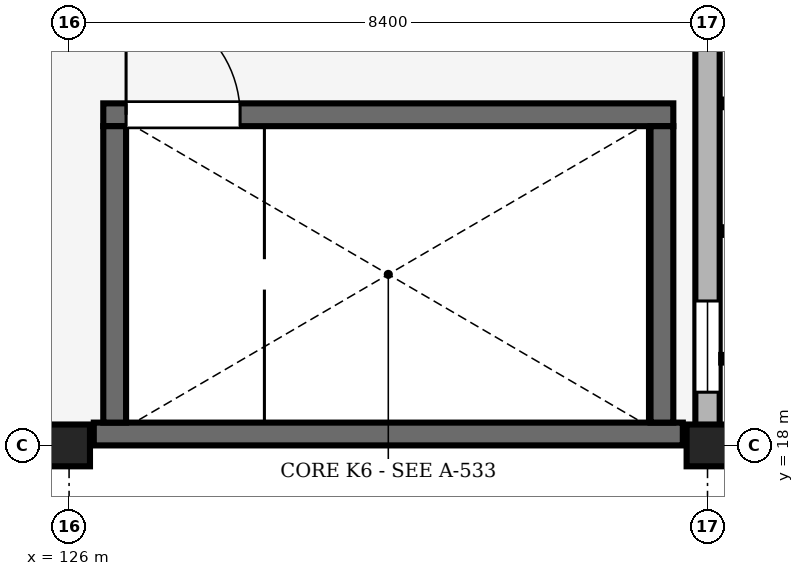
"""IFC4 building model, lengths in metres.
Left out: names, types, materials, properties, quantities, classifications, styles, units other than length and angle.
Written with IfcOpenShell. Run it as: python <this file> out.ifc"""

import sys

from ifc_helpers import new_model, si_unit, direction, frame, frame_2d, origin, origin_2d, place, context, subcontext, project, spatial, rectangle, extrude, element, fill, save


model = new_model("IFC4")
c1 = context("Model", 3, precision=1e-05, world=origin(), true_north=direction((0.0, 1.0)))
c2 = subcontext(c1, "Body", "Model", "MODEL_VIEW")
j1 = project(units=[si_unit("LENGTHUNIT", "METRE"), si_unit("PLANEANGLEUNIT", "RADIAN")], contexts=[c1])
p1 = place(None, origin())
s1 = spatial("IfcSite", under=j1, at=p1, CompositionType="ELEMENT")
p2 = place(p1, origin())
s2 = spatial("IfcBuilding", under=s1, at=p2, CompositionType="ELEMENT")
p3 = place(p2, frame((0.0, 0.0, 9.0)))
s3 = spatial("IfcBuildingStorey", under=s2, at=p3, CompositionType="ELEMENT", Elevation=9.0)
for number, where, z_axis, x_axis in (
    (1, (126.0, 18.0, 0.0), (0.0, 0.0, 1.0), (1.0, 0.0, 0.0)),
    (2, (134.4, 18.0, 0.0), (0.0, 0.0, 1.0), (1.0, 0.0, 0.0)),
):
    element("IfcColumn", number, at=place(p3, frame(where, z_axis=z_axis, x_axis=x_axis)), inside=s3, PredefinedType="COLUMN", context=c2, shape_type="SweptSolid", body=[
        extrude(rectangle(XDim=0.55, YDim=0.55, at=origin_2d()), origin(), (0.0, 0.0, 1.0), 4.2),
    ])
p4 = place(p3, frame((134.4, 18.25, 0.0), z_axis=(0.0, 0.0, 1.0), x_axis=(0.0, 1.0, 0.0)))
e3 = element("IfcWall", 3, at=p4, inside=s3, PredefinedType="SOLIDWALL", context=c2, shape_type="SweptSolid", body=[
    extrude(rectangle(XDim=8.5, YDim=0.32, at=frame_2d((4.25, 0.0))), origin(), (0.0, 0.0, 1.0), 3.43),
])
p5 = place(p4, frame((0.45, 0.0, 0.85)))
e4 = element("IfcOpeningElement", 4, at=p5, cuts=e3, PredefinedType="OPENING", context=c2, shape_type="SweptSolid", body=[
    extrude(rectangle(XDim=1.2, YDim=1.8, at=frame_2d((0.6, 0.9))), frame((0.0, 0.17, 0.0), z_axis=(0.0, -1.0, 0.0), x_axis=(1.0, 0.0, 0.0)), (0.0, 0.0, 1.0), 0.34),
])
p6 = place(p4, frame((5.45, 0.0, 0.85)))
e5 = element("IfcOpeningElement", 5, at=p6, cuts=e3, PredefinedType="OPENING", context=c2, shape_type="SweptSolid", body=[
    extrude(rectangle(XDim=1.2, YDim=1.8, at=frame_2d((0.6, 0.9))), frame((0.0, 0.17, 0.0), z_axis=(0.0, -1.0, 0.0), x_axis=(1.0, 0.0, 0.0)), (0.0, 0.0, 1.0), 0.34),
])
p7 = place(p3, frame((134.53, 18.13, 0.0), z_axis=(0.0, 0.0, 1.0), x_axis=(1.0, 0.0, 0.0)))
e6 = element("IfcWall", 6, at=p7, inside=s3, PredefinedType="PARAPET", context=c2, shape_type="SweptSolid", body=[
    extrude(rectangle(XDim=8.14, YDim=0.26, at=frame_2d((4.07, 0.0))), origin(), (0.0, 0.0, 1.0), 0.85),
])
p8 = place(p3, frame((126.325, 18.15, 0.0), z_axis=(0.0, 0.0, 1.0), x_axis=(1.0, 0.0, 0.0)))
e7 = element("IfcWall", 7, at=p8, inside=s3, PredefinedType="SHEAR", context=c2, shape_type="SweptSolid", body=[
    extrude(rectangle(XDim=7.75, YDim=0.3, at=frame_2d((3.875, 0.0))), origin(), (0.0, 0.0, 1.0), 4.025),
])
p9 = place(p3, frame((126.45, 22.35, 0.0), z_axis=(0.0, 0.0, 1.0), x_axis=(1.0, 0.0, 0.0)))
e8 = element("IfcWall", 8, at=p9, inside=s3, PredefinedType="SHEAR", context=c2, shape_type="SweptSolid", body=[
    extrude(rectangle(XDim=7.5, YDim=0.3, at=frame_2d((3.75, 0.0))), origin(), (0.0, 0.0, 1.0), 4.025),
])
p10 = place(p9, frame((0.3, 0.0, 0.0)))
e9 = element("IfcOpeningElement", 9, at=p10, cuts=e8, PredefinedType="OPENING", context=c2, shape_type="SweptSolid", body=[
    extrude(rectangle(XDim=1.5, YDim=2.2, at=frame_2d((0.75, 1.1))), frame((0.0, 0.16, 0.0), z_axis=(0.0, -1.0, 0.0), x_axis=(1.0, 0.0, 0.0)), (0.0, 0.0, 1.0), 0.32),
])
for number, where, z_axis, x_axis in (
    (10, (126.6, 18.3, 0.0), (0.0, 0.0, 1.0), (0.0, 1.0, 0.0)),
    (11, (133.8, 18.3, 0.0), (0.0, 0.0, 1.0), (0.0, 1.0, 0.0)),
):
    element("IfcWall", number, at=place(p3, frame(where, z_axis=z_axis, x_axis=x_axis)), inside=s3, PredefinedType="SHEAR", context=c2, shape_type="SweptSolid", body=[
        extrude(rectangle(XDim=3.9, YDim=0.3, at=frame_2d((1.95, 0.0))), origin(), (0.0, 0.0, 1.0), 4.025),
    ])
p11 = place(p5, origin())
e12 = element("IfcWindow", 12, at=p11, inside=s3, PartitioningType="SINGLE_PANEL", PredefinedType="WINDOW", context=c2, shape_type="SweptSolid", body=[
    extrude(rectangle(XDim=1.2, YDim=1.8, at=frame_2d((0.6, 0.9))), frame((0.0, 0.03, 0.0), z_axis=(0.0, -1.0, 0.0), x_axis=(1.0, 0.0, 0.0)), (0.0, 0.0, 1.0), 0.06),
])
fill(e4, e12)
p12 = place(p10, origin())
e13 = element("IfcDoor", 13, at=p12, inside=s3, OperationType="DOUBLE_DOOR_SINGLE_SWING", PredefinedType="DOOR", context=c2, shape_type="SweptSolid", body=[
    extrude(rectangle(XDim=1.5, YDim=2.2, at=frame_2d((0.75, 1.1))), frame((0.0, 0.025, 0.0), z_axis=(0.0, -1.0, 0.0), x_axis=(1.0, 0.0, 0.0)), (0.0, 0.0, 1.0), 0.05),
])
fill(e9, e13)
save(model, sys.argv[1])
